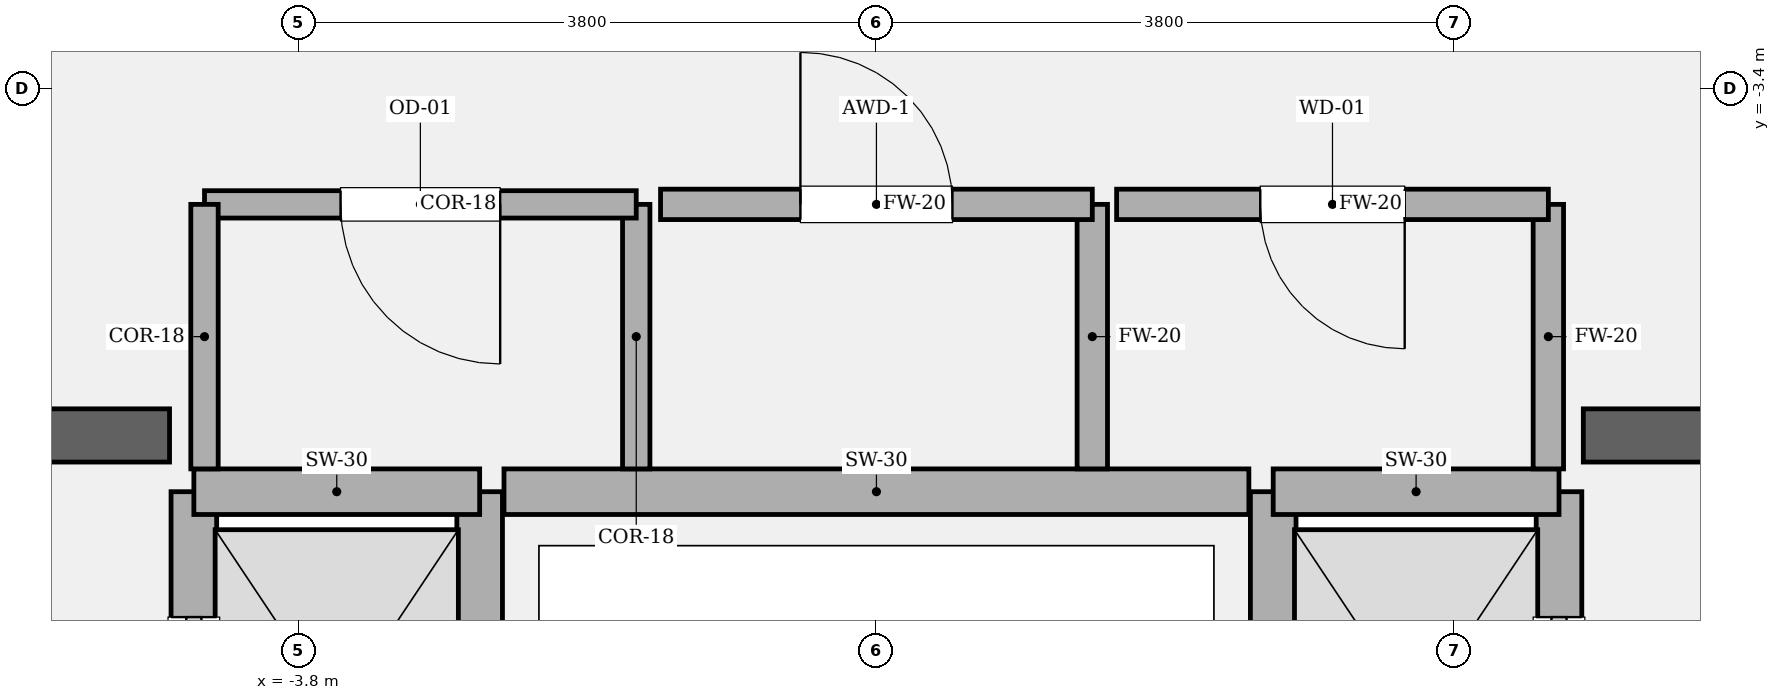
"""IFC4 building model, lengths in metres.
Left out: names, types, materials, properties, quantities, classifications, styles, units other than length and angle.
Written with IfcOpenShell. Run it as: python <this file> out.ifc"""

import sys

from ifc_helpers import new_model, si_unit, direction, frame, frame_2d, origin, place, context, subcontext, project, spatial, rectangle, extrude, element, fill, save


model = new_model("IFC4")
c1 = context("Model", 3, precision=1e-05, world=origin(), true_north=direction((0.0, 1.0)))
c2 = subcontext(c1, "Body", "Model", "MODEL_VIEW")
j1 = project(units=[si_unit("LENGTHUNIT", "METRE"), si_unit("PLANEANGLEUNIT", "RADIAN")], contexts=[c1])
p1 = place(None, origin())
s1 = spatial("IfcSite", under=j1, at=p1, CompositionType="ELEMENT")
p2 = place(p1, origin())
s2 = spatial("IfcBuilding", under=s1, at=p2, CompositionType="ELEMENT")
p3 = place(p2, frame((0.0, 0.0, 121.35)))
s3 = spatial("IfcBuildingStorey", under=s2, at=p3, CompositionType="ELEMENT", Elevation=121.35)
p4 = place(p3, frame((-9.825, -5.68, 0.0), z_axis=(0.0, 0.0, 1.0), x_axis=(1.0, 0.0, 0.0)))
e1 = element("IfcWall", 1, at=p4, inside=s3, PredefinedType="SOLIDWALL", context=c2, shape_type="SweptSolid", body=[
    extrude(rectangle(XDim=5.175, YDim=0.35, at=frame_2d((2.587, 0.0))), origin(), (0.0, 0.0, 1.0), 4.05),
])
p5 = place(p4, frame((1.285, 0.0, 0.0)))
e2 = element("IfcOpeningElement", 2, at=p5, cuts=e1, PredefinedType="OPENING", context=c2, shape_type="SweptSolid", body=[
    extrude(rectangle(XDim=1.18, YDim=2.2, at=frame_2d((0.59, 1.1))), frame((0.0, 0.185, 0.0), z_axis=(0.0, -1.0, 0.0), x_axis=(1.0, 0.0, 0.0)), (0.0, 0.0, 1.0), 0.37),
])
p6 = place(p3, frame((4.65, -5.68, 0.0), z_axis=(0.0, 0.0, 1.0), x_axis=(1.0, 0.0, 0.0)))
e3 = element("IfcWall", 3, at=p6, inside=s3, PredefinedType="SOLIDWALL", context=c2, shape_type="SweptSolid", body=[
    extrude(rectangle(XDim=5.175, YDim=0.35, at=frame_2d((2.587, 0.0))), origin(), (0.0, 0.0, 1.0), 4.05),
])
p7 = place(p6, frame((2.71, 0.0, 0.0)))
e4 = element("IfcOpeningElement", 4, at=p7, cuts=e3, PredefinedType="OPENING", context=c2, shape_type="SweptSolid", body=[
    extrude(rectangle(XDim=1.18, YDim=2.2, at=frame_2d((0.59, 1.1))), frame((0.0, 0.185, 0.0), z_axis=(0.0, -1.0, 0.0), x_axis=(1.0, 0.0, 0.0)), (0.0, 0.0, 1.0), 0.37),
])
p8 = place(p3, frame((-4.49, -8.82, 0.0), z_axis=(0.0, 0.0, 1.0), x_axis=(0.0, 1.0, 0.0)))
e5 = element("IfcWall", 5, at=p8, inside=s3, PredefinedType="SOLIDWALL", context=c2, shape_type="SweptSolid", body=[
    extrude(rectangle(XDim=2.77, YDim=0.3, at=frame_2d((1.385, 0.0))), origin(), (0.0, 0.0, 1.0), 3.73),
])
p9 = place(p8, frame((0.825, 0.0, 0.0)))
e6 = element("IfcOpeningElement", 6, at=p9, cuts=e5, PredefinedType="OPENING", context=c2, shape_type="SweptSolid", body=[
    extrude(rectangle(XDim=1.12, YDim=2.25, at=frame_2d((0.56, 1.125))), frame((0.0, 0.16, 0.0), z_axis=(0.0, -1.0, 0.0), x_axis=(1.0, 0.0, 0.0)), (0.0, 0.0, 1.0), 0.32),
])
p10 = place(p3, frame((-2.61, -8.82, 0.0), z_axis=(0.0, 0.0, 1.0), x_axis=(0.0, 1.0, 0.0)))
e7 = element("IfcWall", 7, at=p10, inside=s3, PredefinedType="SOLIDWALL", context=c2, shape_type="SweptSolid", body=[
    extrude(rectangle(XDim=2.77, YDim=0.3, at=frame_2d((1.385, 0.0))), origin(), (0.0, 0.0, 1.0), 3.73),
])
p11 = place(p3, frame((-4.49, -6.05, 0.0), z_axis=(0.0, 0.0, 1.0), x_axis=(1.0, 0.0, 0.0)))
e8 = element("IfcWall", 8, at=p11, inside=s3, PredefinedType="SOLIDWALL", context=c2, shape_type="SweptSolid", body=[
    extrude(rectangle(XDim=1.88, YDim=0.3, at=frame_2d((0.94, 0.0))), origin(), (0.0, 0.0, 1.0), 3.73),
])
p12 = place(p3, frame((4.49, -8.82, 0.0), z_axis=(0.0, 0.0, 1.0), x_axis=(0.0, 1.0, 0.0)))
e9 = element("IfcWall", 9, at=p12, inside=s3, PredefinedType="SOLIDWALL", context=c2, shape_type="SweptSolid", body=[
    extrude(rectangle(XDim=2.77, YDim=0.3, at=frame_2d((1.385, 0.0))), origin(), (0.0, 0.0, 1.0), 3.73),
])
p13 = place(p12, frame((0.825, 0.0, 0.0)))
e10 = element("IfcOpeningElement", 10, at=p13, cuts=e9, PredefinedType="OPENING", context=c2, shape_type="SweptSolid", body=[
    extrude(rectangle(XDim=1.12, YDim=2.25, at=frame_2d((0.56, 1.125))), frame((0.0, 0.16, 0.0), z_axis=(0.0, -1.0, 0.0), x_axis=(1.0, 0.0, 0.0)), (0.0, 0.0, 1.0), 0.32),
])
p14 = place(p3, frame((2.61, -8.82, 0.0), z_axis=(0.0, 0.0, 1.0), x_axis=(0.0, 1.0, 0.0)))
e11 = element("IfcWall", 11, at=p14, inside=s3, PredefinedType="SOLIDWALL", context=c2, shape_type="SweptSolid", body=[
    extrude(rectangle(XDim=2.77, YDim=0.3, at=frame_2d((1.385, 0.0))), origin(), (0.0, 0.0, 1.0), 3.73),
])
p15 = place(p3, frame((2.61, -6.05, 0.0), z_axis=(0.0, 0.0, 1.0), x_axis=(1.0, 0.0, 0.0)))
e12 = element("IfcWall", 12, at=p15, inside=s3, PredefinedType="SOLIDWALL", context=c2, shape_type="SweptSolid", body=[
    extrude(rectangle(XDim=1.88, YDim=0.3, at=frame_2d((0.94, 0.0))), origin(), (0.0, 0.0, 1.0), 3.73),
])
p16 = place(p3, frame((-2.45, -6.05, 0.0), z_axis=(0.0, 0.0, 1.0), x_axis=(1.0, 0.0, 0.0)))
e13 = element("IfcWall", 13, at=p16, inside=s3, PredefinedType="SOLIDWALL", context=c2, shape_type="SweptSolid", body=[
    extrude(rectangle(XDim=4.9, YDim=0.3, at=frame_2d((2.45, 0.0))), origin(), (0.0, 0.0, 1.0), 3.73),
])
p17 = place(p3, frame((-1.58, -5.9, 0.0), z_axis=(0.0, 0.0, 1.0), x_axis=(0.0, 1.0, 0.0)))
e14 = element("IfcWall", 14, at=p17, inside=s3, PredefinedType="PARTITIONING", context=c2, shape_type="SweptSolid", body=[
    extrude(rectangle(XDim=1.74, YDim=0.18, at=frame_2d((0.87, 0.0))), origin(), (0.0, 0.0, 1.0), 3.73),
])
p18 = place(p3, frame((-1.58, -4.16, 0.0), z_axis=(0.0, 0.0, 1.0), x_axis=(-1.0, 0.0, 0.0)))
e15 = element("IfcWall", 15, at=p18, inside=s3, PredefinedType="PARTITIONING", context=c2, shape_type="SweptSolid", body=[
    extrude(rectangle(XDim=2.84, YDim=0.18, at=frame_2d((1.42, 0.0))), origin(), (0.0, 0.0, 1.0), 3.73),
])
p19 = place(p18, frame((0.895, 0.0, 0.0)))
e16 = element("IfcOpeningElement", 16, at=p19, cuts=e15, PredefinedType="OPENING", context=c2, shape_type="SweptSolid", body=[
    extrude(rectangle(XDim=1.05, YDim=2.2, at=frame_2d((0.525, 1.1))), frame((0.0, 0.1, 0.0), z_axis=(0.0, -1.0, 0.0), x_axis=(1.0, 0.0, 0.0)), (0.0, 0.0, 1.0), 0.2),
])
p20 = place(p3, frame((-4.42, -4.16, 0.0), z_axis=(0.0, 0.0, 1.0), x_axis=(0.0, -1.0, 0.0)))
e17 = element("IfcWall", 17, at=p20, inside=s3, PredefinedType="PARTITIONING", context=c2, shape_type="SweptSolid", body=[
    extrude(rectangle(XDim=1.74, YDim=0.18, at=frame_2d((0.87, 0.0))), origin(), (0.0, 0.0, 1.0), 3.73),
])
p21 = place(p3, frame((1.42, -5.9, 0.0), z_axis=(0.0, 0.0, 1.0), x_axis=(0.0, 1.0, 0.0)))
e18 = element("IfcWall", 18, at=p21, inside=s3, PredefinedType="SOLIDWALL", context=c2, shape_type="SweptSolid", body=[
    extrude(rectangle(XDim=1.74, YDim=0.2, at=frame_2d((0.87, 0.0))), origin(), (0.0, 0.0, 1.0), 3.73),
])
p22 = place(p3, frame((1.42, -4.16, 0.0), z_axis=(0.0, 0.0, 1.0), x_axis=(-1.0, 0.0, 0.0)))
e19 = element("IfcWall", 19, at=p22, inside=s3, PredefinedType="SOLIDWALL", context=c2, shape_type="SweptSolid", body=[
    extrude(rectangle(XDim=2.84, YDim=0.2, at=frame_2d((1.42, 0.0))), origin(), (0.0, 0.0, 1.0), 3.73),
])
p23 = place(p22, frame((0.92, 0.0, 0.0)))
e20 = element("IfcOpeningElement", 20, at=p23, cuts=e19, PredefinedType="OPENING", context=c2, shape_type="SweptSolid", body=[
    extrude(rectangle(XDim=1.0, YDim=2.15, at=frame_2d((0.5, 1.075))), frame((0.0, 0.11, 0.0), z_axis=(0.0, -1.0, 0.0), x_axis=(1.0, 0.0, 0.0)), (0.0, 0.0, 1.0), 0.22),
])
p24 = place(p3, frame((4.42, -5.9, 0.0), z_axis=(0.0, 0.0, 1.0), x_axis=(0.0, 1.0, 0.0)))
e21 = element("IfcWall", 21, at=p24, inside=s3, PredefinedType="SOLIDWALL", context=c2, shape_type="SweptSolid", body=[
    extrude(rectangle(XDim=1.74, YDim=0.2, at=frame_2d((0.87, 0.0))), origin(), (0.0, 0.0, 1.0), 3.73),
])
p25 = place(p3, frame((4.42, -4.16, 0.0), z_axis=(0.0, 0.0, 1.0), x_axis=(-1.0, 0.0, 0.0)))
e22 = element("IfcWall", 22, at=p25, inside=s3, PredefinedType="SOLIDWALL", context=c2, shape_type="SweptSolid", body=[
    extrude(rectangle(XDim=2.84, YDim=0.2, at=frame_2d((1.42, 0.0))), origin(), (0.0, 0.0, 1.0), 3.73),
])
p26 = place(p25, frame((0.945, 0.0, 0.0)))
e23 = element("IfcOpeningElement", 23, at=p26, cuts=e22, PredefinedType="OPENING", context=c2, shape_type="SweptSolid", body=[
    extrude(rectangle(XDim=0.95, YDim=2.15, at=frame_2d((0.475, 1.075))), frame((0.0, 0.11, 0.0), z_axis=(0.0, -1.0, 0.0), x_axis=(1.0, 0.0, 0.0)), (0.0, 0.0, 1.0), 0.22),
])
p27 = place(p9, origin())
e24 = element("IfcDoor", 24, at=p27, inside=s3, OperationType="SLIDING_TO_LEFT", PredefinedType="DOOR", context=c2, shape_type="SweptSolid", body=[
    extrude(rectangle(XDim=1.12, YDim=2.25, at=frame_2d((0.56, 1.125))), frame((0.0, 0.025, 0.0), z_axis=(0.0, -1.0, 0.0), x_axis=(1.0, 0.0, 0.0)), (0.0, 0.0, 1.0), 0.05),
])
fill(e6, e24)
p28 = place(p13, origin())
e25 = element("IfcDoor", 25, at=p28, inside=s3, OperationType="SLIDING_TO_RIGHT", PredefinedType="DOOR", context=c2, shape_type="SweptSolid", body=[
    extrude(rectangle(XDim=1.12, YDim=2.25, at=frame_2d((0.56, 1.125))), frame((0.0, 0.025, 0.0), z_axis=(0.0, -1.0, 0.0), x_axis=(1.0, 0.0, 0.0)), (0.0, 0.0, 1.0), 0.05),
])
fill(e10, e25)
p29 = place(p19, origin())
e26 = element("IfcDoor", 26, at=p29, inside=s3, OperationType="SINGLE_SWING_LEFT", PredefinedType="DOOR", context=c2, shape_type="SweptSolid", body=[
    extrude(rectangle(XDim=1.05, YDim=2.2, at=frame_2d((0.525, 1.1))), frame((0.0, 0.025, 0.0), z_axis=(0.0, -1.0, 0.0), x_axis=(1.0, 0.0, 0.0)), (0.0, 0.0, 1.0), 0.05),
])
fill(e16, e26)
p30 = place(p23, origin())
e27 = element("IfcDoor", 27, at=p30, inside=s3, OperationType="SINGLE_SWING_RIGHT", PredefinedType="DOOR", context=c2, shape_type="SweptSolid", body=[
    extrude(rectangle(XDim=1.0, YDim=2.15, at=frame_2d((0.5, 1.075))), frame((0.0, 0.025, 0.0), z_axis=(0.0, -1.0, 0.0), x_axis=(1.0, 0.0, 0.0)), (0.0, 0.0, 1.0), 0.05),
])
fill(e20, e27)
p31 = place(p26, origin())
e28 = element("IfcDoor", 28, at=p31, inside=s3, OperationType="SINGLE_SWING_LEFT", PredefinedType="DOOR", context=c2, shape_type="SweptSolid", body=[
    extrude(rectangle(XDim=0.95, YDim=2.15, at=frame_2d((0.475, 1.075))), frame((0.0, 0.025, 0.0), z_axis=(0.0, -1.0, 0.0), x_axis=(1.0, 0.0, 0.0)), (0.0, 0.0, 1.0), 0.05),
])
fill(e23, e28)
save(model, sys.argv[1])
